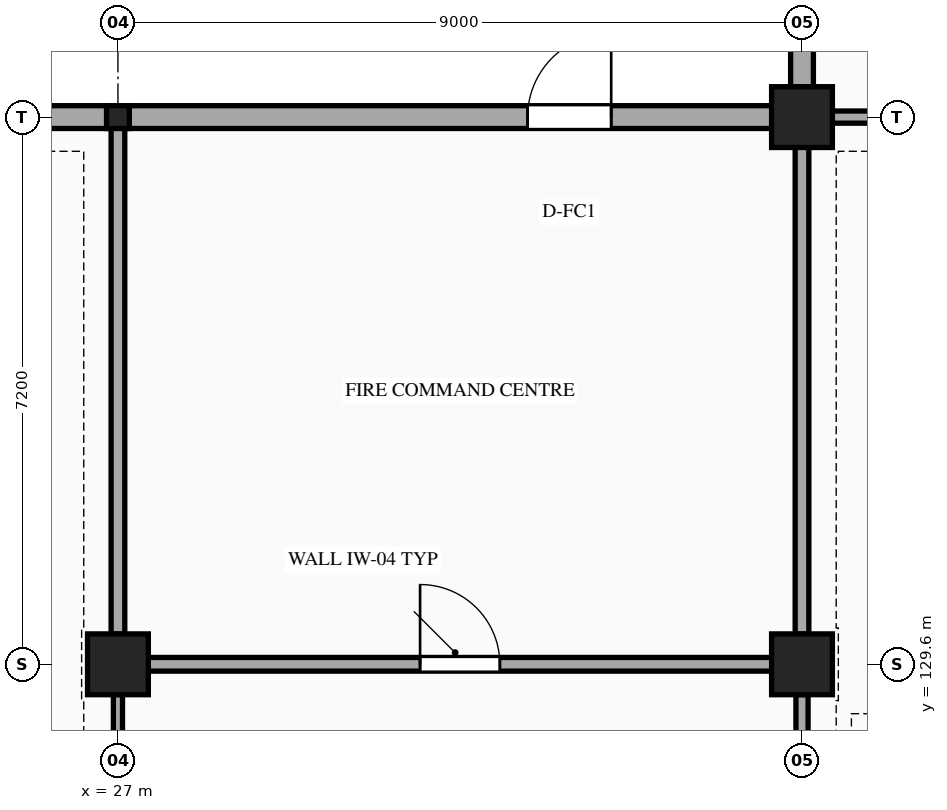
"""IFC4 building model, lengths in metres.
Left out: names, types, materials, properties, quantities, classifications, styles, units other than length and angle.
Written with IfcOpenShell. Run it as: python <this file> out.ifc"""

import sys

from ifc_helpers import new_model, si_unit, direction, frame, frame_2d, origin, origin_2d, place, context, subcontext, project, spatial, rectangle, hollow_rectangle, extrude, element, fill, save


model = new_model("IFC4")
c1 = context("Model", 3, precision=1e-05, world=origin(), true_north=direction((0.0, 1.0)))
c2 = subcontext(c1, "Body", "Model", "MODEL_VIEW")
j1 = project(units=[si_unit("LENGTHUNIT", "METRE"), si_unit("PLANEANGLEUNIT", "RADIAN")], contexts=[c1])
p1 = place(None, origin())
s1 = spatial("IfcSite", under=j1, at=p1, CompositionType="ELEMENT")
p2 = place(p1, origin())
s2 = spatial("IfcBuilding", under=s1, at=p2, CompositionType="ELEMENT")
p3 = place(p2, origin())
s3 = spatial("IfcBuildingStorey", under=s2, at=p3, CompositionType="ELEMENT", Elevation=0.0)
p4 = place(p3, frame((27.0, 129.6, 0.0), z_axis=(0.0, 0.0, 1.0), x_axis=(1.0, 0.0, 0.0)))
e1 = element("IfcColumn", 1, at=p4, inside=s3, PredefinedType="COLUMN", context=c2, shape_type="SweptSolid", body=[
    extrude(rectangle(XDim=0.8, YDim=0.8, at=origin_2d()), origin(), (0.0, 0.0, 1.0), 5.4),
])
p5 = place(p3, frame((27.0, 136.8, 0.0), z_axis=(0.0, 0.0, 1.0), x_axis=(1.0, 0.0, 0.0)))
e2 = element("IfcColumn", 2, at=p5, inside=s3, PredefinedType="COLUMN", context=c2, shape_type="SweptSolid", body=[
    extrude(hollow_rectangle(XDim=0.3, YDim=0.3, WallThickness=0.016, at=origin_2d()), origin(), (0.0, 0.0, 1.0), 5.4),
])
for number, where, z_axis, x_axis in (
    (3, (36.0, 129.6, 0.0), (0.0, 0.0, 1.0), (1.0, 0.0, 0.0)),
    (4, (36.0, 136.8, 0.0), (0.0, 0.0, 1.0), (1.0, 0.0, 0.0)),
):
    element("IfcColumn", number, at=place(p3, frame(where, z_axis=z_axis, x_axis=x_axis)), inside=s3, PredefinedType="COLUMN", context=c2, shape_type="SweptSolid", body=[
        extrude(rectangle(XDim=0.8, YDim=0.8, at=origin_2d()), origin(), (0.0, 0.0, 1.0), 5.4),
    ])
p6 = place(p3, frame((18.398, 136.8, 0.0), z_axis=(0.0, 0.0, 1.0), x_axis=(1.0, 0.0, 0.0)))
e5 = element("IfcWall", 5, at=p6, inside=s3, PredefinedType="STANDARD", context=c2, shape_type="SweptSolid", body=[
    extrude(rectangle(XDim=8.454, YDim=0.3, at=frame_2d((4.227, 0.0))), origin(), (0.0, 0.0, 1.0), 4.437),
])
p7 = place(p6, frame((3.127, 0.0, 0.0)))
e6 = element("IfcOpeningElement", 6, at=p7, cuts=e5, PredefinedType="OPENING", context=c2, shape_type="SweptSolid", body=[
    extrude(rectangle(XDim=2.2, YDim=2.4, at=frame_2d((1.1, 1.2))), frame((0.0, 0.16, 0.0), z_axis=(0.0, -1.0, 0.0), x_axis=(1.0, 0.0, 0.0)), (0.0, 0.0, 1.0), 0.32),
])
p8 = place(p3, frame((27.148, 136.8, 0.0), z_axis=(0.0, 0.0, 1.0), x_axis=(1.0, 0.0, 0.0)))
e7 = element("IfcWall", 7, at=p8, inside=s3, PredefinedType="STANDARD", context=c2, shape_type="SweptSolid", body=[
    extrude(rectangle(XDim=8.454, YDim=0.3, at=frame_2d((4.227, 0.0))), origin(), (0.0, 0.0, 1.0), 4.437),
])
p9 = place(p8, frame((5.241, 0.0, 0.0)))
e8 = element("IfcOpeningElement", 8, at=p9, cuts=e7, PredefinedType="OPENING", context=c2, shape_type="SweptSolid", body=[
    extrude(rectangle(XDim=1.1, YDim=2.2, at=frame_2d((0.55, 1.1))), frame((0.0, 0.16, 0.0), z_axis=(0.0, -1.0, 0.0), x_axis=(1.0, 0.0, 0.0)), (0.0, 0.0, 1.0), 0.32),
])
p10 = place(p3, frame((36.0, 137.198, 0.0), z_axis=(0.0, 0.0, 1.0), x_axis=(0.0, 1.0, 0.0)))
e9 = element("IfcWall", 9, at=p10, inside=s3, PredefinedType="STANDARD", context=c2, shape_type="SweptSolid", body=[
    extrude(rectangle(XDim=6.404, YDim=0.3, at=frame_2d((3.202, 0.0))), origin(), (0.0, 0.0, 1.0), 4.82),
])
p11 = place(p10, frame((2.102, 0.0, 0.0)))
e10 = element("IfcOpeningElement", 10, at=p11, cuts=e9, PredefinedType="OPENING", context=c2, shape_type="SweptSolid", body=[
    extrude(rectangle(XDim=2.2, YDim=2.4, at=frame_2d((1.1, 1.2))), frame((0.0, 0.16, 0.0), z_axis=(0.0, -1.0, 0.0), x_axis=(1.0, 0.0, 0.0)), (0.0, 0.0, 1.0), 0.32),
])
p12 = place(p3, frame((27.398, 129.6, 0.0), z_axis=(0.0, 0.0, 1.0), x_axis=(1.0, 0.0, 0.0)))
e11 = element("IfcWall", 11, at=p12, inside=s3, PredefinedType="PARTITIONING", context=c2, shape_type="SweptSolid", body=[
    extrude(rectangle(XDim=8.204, YDim=0.18, at=frame_2d((4.102, 0.0))), origin(), (0.0, 0.0, 1.0), 4.424),
])
p13 = place(p12, frame((3.577, 0.0, 0.0)))
e12 = element("IfcOpeningElement", 12, at=p13, cuts=e11, PredefinedType="OPENING", context=c2, shape_type="SweptSolid", body=[
    extrude(rectangle(XDim=1.05, YDim=2.15, at=frame_2d((0.525, 1.075))), frame((0.0, 0.1, 0.0), z_axis=(0.0, -1.0, 0.0), x_axis=(1.0, 0.0, 0.0)), (0.0, 0.0, 1.0), 0.2),
])
p14 = place(p3, frame((36.398, 136.8, 0.0), z_axis=(0.0, 0.0, 1.0), x_axis=(1.0, 0.0, 0.0)))
e13 = element("IfcWall", 13, at=p14, inside=s3, PredefinedType="PARTITIONING", context=c2, shape_type="SweptSolid", body=[
    extrude(rectangle(XDim=8.204, YDim=0.16, at=frame_2d((4.102, 0.0))), origin(), (0.0, 0.0, 1.0), 4.424),
])
p15 = place(p14, frame((3.302, 0.0, 0.0)))
e14 = element("IfcOpeningElement", 14, at=p15, cuts=e13, PredefinedType="OPENING", context=c2, shape_type="SweptSolid", body=[
    extrude(rectangle(XDim=1.6, YDim=2.2, at=frame_2d((0.8, 1.1))), frame((0.0, 0.09, 0.0), z_axis=(0.0, -1.0, 0.0), x_axis=(1.0, 0.0, 0.0)), (0.0, 0.0, 1.0), 0.18),
])
p16 = place(p3, frame((27.0, 122.798, 0.0), z_axis=(0.0, 0.0, 1.0), x_axis=(0.0, 1.0, 0.0)))
e15 = element("IfcWall", 15, at=p16, inside=s3, PredefinedType="PARTITIONING", context=c2, shape_type="SweptSolid", body=[
    extrude(rectangle(XDim=6.404, YDim=0.12, at=frame_2d((3.202, 0.0))), origin(), (0.0, 0.0, 1.0), 4.437),
])
p17 = place(p3, frame((27.0, 129.998, 0.0), z_axis=(0.0, 0.0, 1.0), x_axis=(0.0, 1.0, 0.0)))
e16 = element("IfcWall", 16, at=p17, inside=s3, PredefinedType="PARTITIONING", context=c2, shape_type="SweptSolid", body=[
    extrude(rectangle(XDim=6.654, YDim=0.18, at=frame_2d((3.327, 0.0))), origin(), (0.0, 0.0, 1.0), 4.437),
])
p18 = place(p3, frame((36.0, 122.65, 0.0), z_axis=(0.0, 0.0, 1.0), x_axis=(0.0, 1.0, 0.0)))
e17 = element("IfcWall", 17, at=p18, inside=s3, PredefinedType="PARTITIONING", context=c2, shape_type="SweptSolid", body=[
    extrude(rectangle(XDim=6.552, YDim=0.16, at=frame_2d((3.276, 0.0))), origin(), (0.0, 0.0, 1.0), 4.424),
])
p19 = place(p3, frame((36.0, 129.998, 0.0), z_axis=(0.0, 0.0, 1.0), x_axis=(0.0, 1.0, 0.0)))
e18 = element("IfcWall", 18, at=p19, inside=s3, PredefinedType="PARTITIONING", context=c2, shape_type="SweptSolid", body=[
    extrude(rectangle(XDim=6.404, YDim=0.18, at=frame_2d((3.202, 0.0))), origin(), (0.0, 0.0, 1.0), 4.437),
])
p20 = place(p9, origin())
e19 = element("IfcDoor", 19, at=p20, inside=s3, OperationType="SINGLE_SWING_RIGHT", PredefinedType="DOOR", context=c2, shape_type="SweptSolid", body=[
    extrude(rectangle(XDim=1.1, YDim=2.2, at=frame_2d((0.55, 1.1))), frame((0.0, 0.025, 0.0), z_axis=(0.0, -1.0, 0.0), x_axis=(1.0, 0.0, 0.0)), (0.0, 0.0, 1.0), 0.05),
])
fill(e8, e19)
p21 = place(p13, origin())
e20 = element("IfcDoor", 20, at=p21, inside=s3, OperationType="SINGLE_SWING_LEFT", PredefinedType="DOOR", context=c2, shape_type="SweptSolid", body=[
    extrude(rectangle(XDim=1.05, YDim=2.15, at=frame_2d((0.525, 1.075))), frame((0.0, 0.025, 0.0), z_axis=(0.0, -1.0, 0.0), x_axis=(1.0, 0.0, 0.0)), (0.0, 0.0, 1.0), 0.05),
])
fill(e12, e20)
save(model, sys.argv[1])
